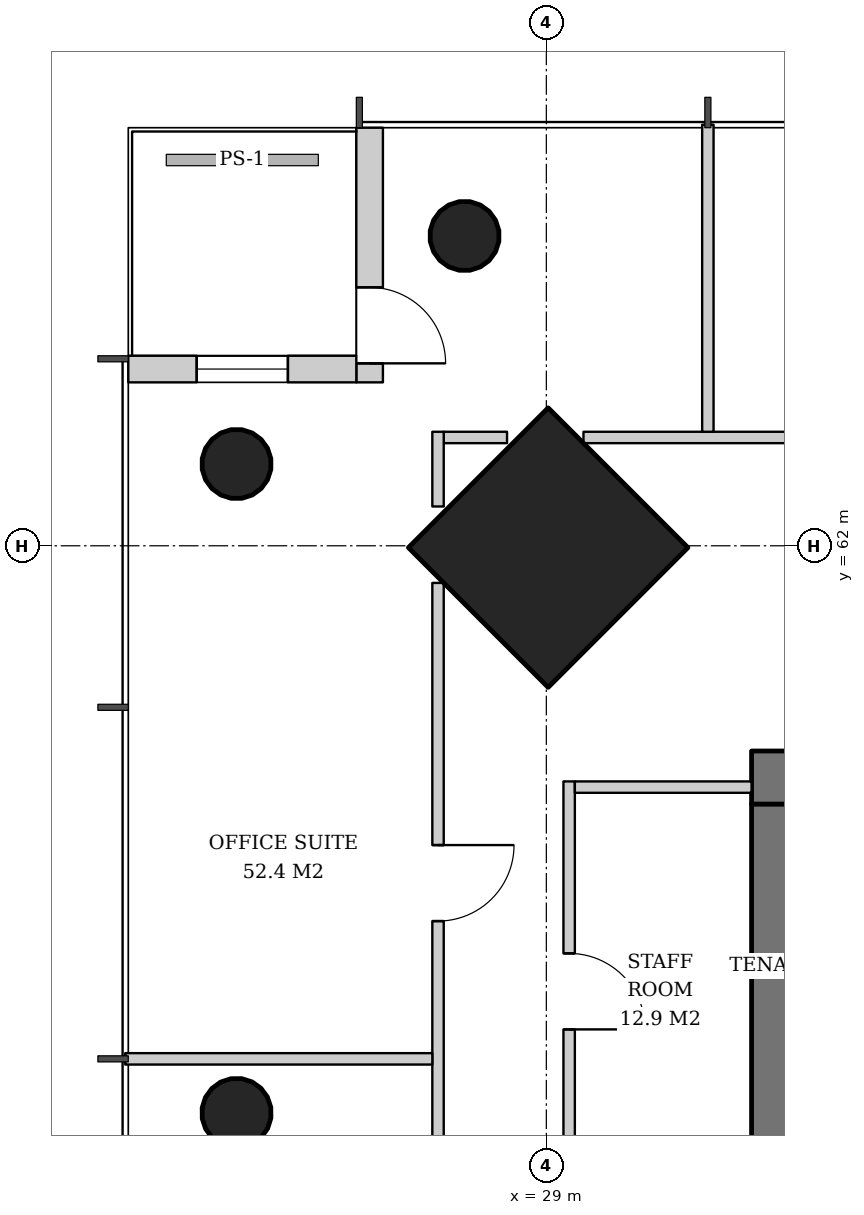
"""IFC4 building model, lengths in metres.
Left out: names, types, materials, properties, quantities, classifications, styles, units other than length and angle.
Written with IfcOpenShell. Run it as: python <this file> out.ifc"""

import sys

from ifc_helpers import new_model, si_unit, direction, frame, frame_2d, origin, origin_2d, place, context, subcontext, project, spatial, rectangle, hollow_circle, extrude, element, fill, save


model = new_model("IFC4")
c1 = context("Model", 3, precision=1e-05, world=origin(), true_north=direction((0.0, 1.0)))
c2 = subcontext(c1, "Body", "Model", "MODEL_VIEW")
j1 = project(units=[si_unit("LENGTHUNIT", "METRE"), si_unit("PLANEANGLEUNIT", "RADIAN")], contexts=[c1])
p1 = place(None, origin())
s1 = spatial("IfcSite", under=j1, at=p1, CompositionType="ELEMENT")
p2 = place(p1, origin())
s2 = spatial("IfcBuilding", under=s1, at=p2, CompositionType="ELEMENT")
p3 = place(p2, frame((0.0, 0.0, 142.6)))
s3 = spatial("IfcBuildingStorey", under=s2, at=p3, CompositionType="ELEMENT", Elevation=142.6)
p4 = place(p3, frame((28.986, 62.014, 0.0), z_axis=(0.031964207655, -0.031964207655, 0.998977766949), x_axis=(0.707106781187, 0.707106781187, 0.0)))
e1 = element("IfcColumn", 1, at=p4, inside=s3, PredefinedType="COLUMN", context=c2, shape_type="SweptSolid", body=[
    extrude(rectangle(XDim=2.6, YDim=2.6, at=origin_2d()), origin(), (0.0, 0.0, 1.0), 3.804),
])
for number, where, z_axis, x_axis in (
    (2, (27.886, 66.114, 0.0), (0.032, -0.032, 0.999), (0.707, 0.707, 0.0)),
    (3, (24.886, 63.114, 0.0), (0.032, -0.032, 0.999), (0.707, 0.707, 0.0)),
):
    element("IfcColumn", number, at=place(p3, frame(where, z_axis=z_axis, x_axis=x_axis)), inside=s3, PredefinedType="COLUMN", context=c2, shape_type="SweptSolid", body=[
        extrude(hollow_circle(Radius=0.457, WallThickness=0.03, at=origin_2d()), origin(), (0.0, 0.0, 1.0), 3.804),
    ])
p5 = place(p3, frame((24.886, 54.557, 0.0), z_axis=(0.031912317206, -0.01598826355, 0.999362786699), x_axis=(0.447933021895, 0.894067115991, 0.0)))
e4 = element("IfcColumn", 4, at=p5, inside=s3, PredefinedType="COLUMN", context=c2, shape_type="SweptSolid", body=[
    extrude(hollow_circle(Radius=0.457, WallThickness=0.03, at=origin_2d()), origin(), (0.0, 0.0, 1.0), 3.802),
])
p6 = place(p3, frame((31.7, 58.95, 0.0), z_axis=(0.0, 0.0, 1.0), x_axis=(1.0, 0.0, 0.0)))
e5 = element("IfcWall", 5, at=p6, inside=s3, PredefinedType="SHEAR", context=c2, shape_type="SweptSolid", body=[
    extrude(rectangle(XDim=26.6, YDim=0.7, at=frame_2d((13.3, 0.0))), origin(), (0.0, 0.0, 1.0), 3.8),
])
p7 = place(p6, frame((17.94, 0.0, 0.0)))
e6 = element("IfcOpeningElement", 6, at=p7, cuts=e5, PredefinedType="OPENING", context=c2, shape_type="SweptSolid", body=[
    extrude(rectangle(XDim=1.0, YDim=2.1, at=frame_2d((0.5, 1.05))), frame((0.0, 0.36, 0.0), z_axis=(0.0, -1.0, 0.0), x_axis=(1.0, 0.0, 0.0)), (0.0, 0.0, 1.0), 0.72),
])
p8 = place(p6, frame((5.825, 0.0, 0.0)))
e7 = element("IfcOpeningElement", 7, at=p8, cuts=e5, PredefinedType="OPENING", context=c2, shape_type="SweptSolid", body=[
    extrude(rectangle(XDim=1.0, YDim=2.1, at=frame_2d((0.5, 1.05))), frame((0.0, 0.36, 0.0), z_axis=(0.0, -1.0, 0.0), x_axis=(1.0, 0.0, 0.0)), (0.0, 0.0, 1.0), 0.72),
])
p9 = place(p6, frame((0.978, 0.0, 0.0)))
e8 = element("IfcOpeningElement", 8, at=p9, cuts=e5, PredefinedType="OPENING", context=c2, shape_type="SweptSolid", body=[
    extrude(rectangle(XDim=1.0, YDim=2.1, at=frame_2d((0.5, 1.05))), frame((0.0, 0.36, 0.0), z_axis=(0.0, -1.0, 0.0), x_axis=(1.0, 0.0, 0.0)), (0.0, 0.0, 1.0), 0.72),
])
p10 = place(p6, frame((2.587, 0.0, 0.0)))
e9 = element("IfcOpeningElement", 9, at=p10, cuts=e5, PredefinedType="OPENING", context=c2, shape_type="SweptSolid", body=[
    extrude(rectangle(XDim=1.0, YDim=2.1, at=frame_2d((0.5, 1.05))), frame((0.0, 0.36, 0.0), z_axis=(0.0, -1.0, 0.0), x_axis=(1.0, 0.0, 0.0)), (0.0, 0.0, 1.0), 0.72),
])
p11 = place(p6, frame((4.211, 0.0, 0.0)))
e10 = element("IfcOpeningElement", 10, at=p11, cuts=e5, PredefinedType="OPENING", context=c2, shape_type="SweptSolid", body=[
    extrude(rectangle(XDim=1.0, YDim=2.1, at=frame_2d((0.5, 1.05))), frame((0.0, 0.36, 0.0), z_axis=(0.0, -1.0, 0.0), x_axis=(1.0, 0.0, 0.0)), (0.0, 0.0, 1.0), 0.72),
])
p12 = place(p6, frame((8.44, 0.0, 0.0)))
e11 = element("IfcOpeningElement", 11, at=p12, cuts=e5, PredefinedType="OPENING", context=c2, shape_type="SweptSolid", body=[
    extrude(rectangle(XDim=1.0, YDim=2.1, at=frame_2d((0.5, 1.05))), frame((0.0, 0.36, 0.0), z_axis=(0.0, -1.0, 0.0), x_axis=(1.0, 0.0, 0.0)), (0.0, 0.0, 1.0), 0.72),
])
p13 = place(p6, frame((13.342, 0.0, 0.0)))
e12 = element("IfcOpeningElement", 12, at=p13, cuts=e5, PredefinedType="OPENING", context=c2, shape_type="SweptSolid", body=[
    extrude(rectangle(XDim=1.0, YDim=2.1, at=frame_2d((0.5, 1.05))), frame((0.0, 0.36, 0.0), z_axis=(0.0, -1.0, 0.0), x_axis=(1.0, 0.0, 0.0)), (0.0, 0.0, 1.0), 0.72),
])
p14 = place(p6, frame((22.4, 0.0, 0.0)))
e13 = element("IfcOpeningElement", 13, at=p14, cuts=e5, PredefinedType="OPENING", context=c2, shape_type="SweptSolid", body=[
    extrude(rectangle(XDim=1.0, YDim=2.1, at=frame_2d((0.5, 1.05))), frame((0.0, 0.36, 0.0), z_axis=(0.0, -1.0, 0.0), x_axis=(1.0, 0.0, 0.0)), (0.0, 0.0, 1.0), 0.72),
])
p15 = place(p3, frame((32.05, 33.4, 0.0), z_axis=(0.0, 0.0, 1.0), x_axis=(0.0, 1.0, 0.0)))
e14 = element("IfcWall", 14, at=p15, inside=s3, PredefinedType="SHEAR", context=c2, shape_type="SweptSolid", body=[
    extrude(rectangle(XDim=25.2, YDim=0.7, at=frame_2d((12.6, 0.0))), origin(), (0.0, 0.0, 1.0), 3.8),
])
p16 = place(p15, frame((11.7, 0.0, 0.0)))
e15 = element("IfcOpeningElement", 15, at=p16, cuts=e14, PredefinedType="OPENING", context=c2, shape_type="SweptSolid", body=[
    extrude(rectangle(XDim=1.8, YDim=2.4, at=frame_2d((0.9, 1.2))), frame((0.0, 0.36, 0.0), z_axis=(0.0, -1.0, 0.0), x_axis=(1.0, 0.0, 0.0)), (0.0, 0.0, 1.0), 0.72),
])
p17 = place(p15, frame((3.6, 0.0, 0.0)))
e16 = element("IfcOpeningElement", 16, at=p17, cuts=e14, PredefinedType="OPENING", context=c2, shape_type="SweptSolid", body=[
    extrude(rectangle(XDim=1.0, YDim=2.1, at=frame_2d((0.5, 1.05))), frame((0.0, 0.36, 0.0), z_axis=(0.0, -1.0, 0.0), x_axis=(1.0, 0.0, 0.0)), (0.0, 0.0, 1.0), 0.72),
])
p18 = place(p15, frame((6.35, 0.0, 0.0)))
e17 = element("IfcOpeningElement", 17, at=p18, cuts=e14, PredefinedType="OPENING", context=c2, shape_type="SweptSolid", body=[
    extrude(rectangle(XDim=1.0, YDim=2.1, at=frame_2d((0.5, 1.05))), frame((0.0, 0.36, 0.0), z_axis=(0.0, -1.0, 0.0), x_axis=(1.0, 0.0, 0.0)), (0.0, 0.0, 1.0), 0.72),
])
p19 = place(p15, frame((9.1, 0.0, 0.0)))
e18 = element("IfcOpeningElement", 18, at=p19, cuts=e14, PredefinedType="OPENING", context=c2, shape_type="SweptSolid", body=[
    extrude(rectangle(XDim=1.0, YDim=2.1, at=frame_2d((0.5, 1.05))), frame((0.0, 0.36, 0.0), z_axis=(0.0, -1.0, 0.0), x_axis=(1.0, 0.0, 0.0)), (0.0, 0.0, 1.0), 0.72),
])
p20 = place(p15, frame((15.1, 0.0, 0.0)))
e19 = element("IfcOpeningElement", 19, at=p20, cuts=e14, PredefinedType="OPENING", context=c2, shape_type="SweptSolid", body=[
    extrude(rectangle(XDim=1.0, YDim=2.1, at=frame_2d((0.5, 1.05))), frame((0.0, 0.36, 0.0), z_axis=(0.0, -1.0, 0.0), x_axis=(1.0, 0.0, 0.0)), (0.0, 0.0, 1.0), 0.72),
])
p21 = place(p15, frame((17.85, 0.0, 0.0)))
e20 = element("IfcOpeningElement", 20, at=p21, cuts=e14, PredefinedType="OPENING", context=c2, shape_type="SweptSolid", body=[
    extrude(rectangle(XDim=1.0, YDim=2.1, at=frame_2d((0.5, 1.05))), frame((0.0, 0.36, 0.0), z_axis=(0.0, -1.0, 0.0), x_axis=(1.0, 0.0, 0.0)), (0.0, 0.0, 1.0), 0.72),
])
p22 = place(p3, frame((26.675, 67.5, 0.0), z_axis=(0.0, 0.0, 1.0), x_axis=(0.0, -1.0, 0.0)))
e21 = element("IfcWall", 21, at=p22, inside=s3, PredefinedType="SOLIDWALL", context=c2, shape_type="SweptSolid", body=[
    extrude(rectangle(XDim=3.35, YDim=0.35, at=frame_2d((1.675, 0.0))), origin(), (0.0, 0.0, 1.0), 3.62),
])
p23 = place(p22, frame((2.1, 0.0, 0.0)))
e22 = element("IfcOpeningElement", 22, at=p23, cuts=e21, PredefinedType="OPENING", context=c2, shape_type="SweptSolid", body=[
    extrude(rectangle(XDim=1.0, YDim=2.4, at=frame_2d((0.5, 1.2))), frame((0.0, 0.185, 0.0), z_axis=(0.0, -1.0, 0.0), x_axis=(1.0, 0.0, 0.0)), (0.0, 0.0, 1.0), 0.37),
])
p24 = place(p3, frame((26.5, 64.325, 0.0), z_axis=(0.0, 0.0, 1.0), x_axis=(-1.0, 0.0, 0.0)))
e23 = element("IfcWall", 23, at=p24, inside=s3, PredefinedType="SOLIDWALL", context=c2, shape_type="SweptSolid", body=[
    extrude(rectangle(XDim=3.0, YDim=0.35, at=frame_2d((1.5, 0.0))), origin(), (0.0, 0.0, 1.0), 3.62),
])
p25 = place(p24, frame((0.9, 0.0, 0.6)))
e24 = element("IfcOpeningElement", 24, at=p25, cuts=e23, PredefinedType="OPENING", context=c2, shape_type="SweptSolid", body=[
    extrude(rectangle(XDim=1.2, YDim=2.55, at=frame_2d((0.6, 1.275))), frame((0.0, 0.185, 0.0), z_axis=(0.0, -1.0, 0.0), x_axis=(1.0, 0.0, 0.0)), (0.0, 0.0, 1.0), 0.37),
])
p26 = place(p3, frame((29.3, 58.9, 0.0), z_axis=(0.0, 0.0, 1.0), x_axis=(0.0, -1.0, 0.0)))
e25 = element("IfcWall", 25, at=p26, inside=s3, PredefinedType="PARTITIONING", context=c2, shape_type="SweptSolid", body=[
    extrude(rectangle(XDim=5.525, YDim=0.15, at=frame_2d((2.762, 0.0))), origin(), (0.0, 0.0, 1.0), 2.72),
])
p27 = place(p26, frame((2.262, 0.0, 0.0)))
e26 = element("IfcOpeningElement", 26, at=p27, cuts=e25, PredefinedType="OPENING", context=c2, shape_type="SweptSolid", body=[
    extrude(rectangle(XDim=1.0, YDim=2.1, at=frame_2d((0.5, 1.05))), frame((0.0, 0.085, 0.0), z_axis=(0.0, -1.0, 0.0), x_axis=(1.0, 0.0, 0.0)), (0.0, 0.0, 1.0), 0.17),
])
p28 = place(p3, frame((31.7, 58.825, 0.0), z_axis=(0.0, 0.0, 1.0), x_axis=(-1.0, 0.0, 0.0)))
e27 = element("IfcWall", 27, at=p28, inside=s3, PredefinedType="PARTITIONING", context=c2, shape_type="SweptSolid", body=[
    extrude(rectangle(XDim=2.325, YDim=0.15, at=frame_2d((1.163, 0.0))), origin(), (0.0, 0.0, 1.0), 2.72),
])
p29 = place(p3, frame((60.511, 63.425, 0.0), z_axis=(0.0, 0.0, 1.0), x_axis=(-1.0, 0.0, 0.0)))
e28 = element("IfcWall", 28, at=p29, inside=s3, PredefinedType="PARTITIONING", context=c2, shape_type="SweptSolid", body=[
    extrude(rectangle(XDim=31.023, YDim=0.15, at=frame_2d((15.511, 0.0))), origin(), (0.0, 0.0, 1.0), 2.72),
])
p30 = place(p29, frame((3.049, 0.0, 0.0)))
e29 = element("IfcOpeningElement", 29, at=p30, cuts=e28, PredefinedType="OPENING", context=c2, shape_type="SweptSolid", body=[
    extrude(rectangle(XDim=1.8, YDim=2.4, at=frame_2d((0.9, 1.2))), frame((0.0, 0.085, 0.0), z_axis=(0.0, -1.0, 0.0), x_axis=(1.0, 0.0, 0.0)), (0.0, 0.0, 1.0), 0.17),
])
p31 = place(p29, frame((7.674, 0.0, 0.0)))
e30 = element("IfcOpeningElement", 30, at=p31, cuts=e28, PredefinedType="OPENING", context=c2, shape_type="SweptSolid", body=[
    extrude(rectangle(XDim=1.8, YDim=2.4, at=frame_2d((0.9, 1.2))), frame((0.0, 0.085, 0.0), z_axis=(0.0, -1.0, 0.0), x_axis=(1.0, 0.0, 0.0)), (0.0, 0.0, 1.0), 0.17),
])
p32 = place(p3, frame((28.483, 63.425, 0.0), z_axis=(0.0, 0.0, 1.0), x_axis=(-1.0, 0.0, 0.0)))
e31 = element("IfcWall", 31, at=p32, inside=s3, PredefinedType="PARTITIONING", context=c2, shape_type="SweptSolid", body=[
    extrude(rectangle(XDim=0.833, YDim=0.15, at=frame_2d((0.417, 0.0))), origin(), (0.0, 0.0, 1.0), 3.32),
])
p33 = place(p3, frame((31.125, 63.5, 0.0), z_axis=(0.0, 0.0, 1.0), x_axis=(0.0, 1.0, 0.0)))
e32 = element("IfcWall", 32, at=p33, inside=s3, PredefinedType="PARTITIONING", context=c2, shape_type="SweptSolid", body=[
    extrude(rectangle(XDim=4.04, YDim=0.15, at=frame_2d((2.02, 0.0))), origin(), (0.0, 0.0, 1.0), 2.82),
])
p34 = place(p3, frame((27.575, 63.5, 0.0), z_axis=(0.0, 0.0, 1.0), x_axis=(0.0, -1.0, 0.0)))
e33 = element("IfcWall", 33, at=p34, inside=s3, PredefinedType="PARTITIONING", context=c2, shape_type="SweptSolid", body=[
    extrude(rectangle(XDim=0.983, YDim=0.15, at=frame_2d((0.491, 0.0))), origin(), (0.0, 0.0, 1.0), 3.32),
])
p35 = place(p3, frame((27.575, 61.511, 0.0), z_axis=(0.0, 0.0, 1.0), x_axis=(0.0, -1.0, 0.0)))
e34 = element("IfcWall", 34, at=p35, inside=s3, PredefinedType="PARTITIONING", context=c2, shape_type="SweptSolid", body=[
    extrude(rectangle(XDim=31.023, YDim=0.15, at=frame_2d((15.511, 0.0))), origin(), (0.0, 0.0, 1.0), 2.72),
])
p36 = place(p35, frame((3.449, 0.0, 0.0)))
e35 = element("IfcOpeningElement", 35, at=p36, cuts=e34, PredefinedType="OPENING", context=c2, shape_type="SweptSolid", body=[
    extrude(rectangle(XDim=1.0, YDim=2.1, at=frame_2d((0.5, 1.05))), frame((0.0, 0.085, 0.0), z_axis=(0.0, -1.0, 0.0), x_axis=(1.0, 0.0, 0.0)), (0.0, 0.0, 1.0), 0.17),
])
p37 = place(p35, frame((8.074, 0.0, 0.0)))
e36 = element("IfcOpeningElement", 36, at=p37, cuts=e34, PredefinedType="OPENING", context=c2, shape_type="SweptSolid", body=[
    extrude(rectangle(XDim=1.0, YDim=2.1, at=frame_2d((0.5, 1.05))), frame((0.0, 0.085, 0.0), z_axis=(0.0, -1.0, 0.0), x_axis=(1.0, 0.0, 0.0)), (0.0, 0.0, 1.0), 0.17),
])
p38 = place(p35, frame((12.699, 0.0, 0.0)))
e37 = element("IfcOpeningElement", 37, at=p38, cuts=e34, PredefinedType="OPENING", context=c2, shape_type="SweptSolid", body=[
    extrude(rectangle(XDim=1.0, YDim=2.1, at=frame_2d((0.5, 1.05))), frame((0.0, 0.085, 0.0), z_axis=(0.0, -1.0, 0.0), x_axis=(1.0, 0.0, 0.0)), (0.0, 0.0, 1.0), 0.17),
])
p39 = place(p35, frame((17.424, 0.0, 0.0)))
e38 = element("IfcOpeningElement", 38, at=p39, cuts=e34, PredefinedType="OPENING", context=c2, shape_type="SweptSolid", body=[
    extrude(rectangle(XDim=0.8, YDim=2.1, at=frame_2d((0.4, 1.05))), frame((0.0, 0.085, 0.0), z_axis=(0.0, -1.0, 0.0), x_axis=(1.0, 0.0, 0.0)), (0.0, 0.0, 1.0), 0.17),
])
p40 = place(p35, frame((21.949, 0.0, 0.0)))
e39 = element("IfcOpeningElement", 39, at=p40, cuts=e34, PredefinedType="OPENING", context=c2, shape_type="SweptSolid", body=[
    extrude(rectangle(XDim=1.0, YDim=2.1, at=frame_2d((0.5, 1.05))), frame((0.0, 0.085, 0.0), z_axis=(0.0, -1.0, 0.0), x_axis=(1.0, 0.0, 0.0)), (0.0, 0.0, 1.0), 0.17),
])
p41 = place(p35, frame((26.674, 0.0, 0.0)))
e40 = element("IfcOpeningElement", 40, at=p41, cuts=e34, PredefinedType="OPENING", context=c2, shape_type="SweptSolid", body=[
    extrude(rectangle(XDim=0.8, YDim=2.1, at=frame_2d((0.4, 1.05))), frame((0.0, 0.085, 0.0), z_axis=(0.0, -1.0, 0.0), x_axis=(1.0, 0.0, 0.0)), (0.0, 0.0, 1.0), 0.17),
])
p42 = place(p3, frame((27.5, 55.25, 0.0), z_axis=(0.0, 0.0, 1.0), x_axis=(-1.0, 0.0, 0.0)))
e41 = element("IfcWall", 41, at=p42, inside=s3, PredefinedType="PARTITIONING", context=c2, shape_type="SweptSolid", body=[
    extrude(rectangle(XDim=4.04, YDim=0.15, at=frame_2d((2.02, 0.0))), origin(), (0.0, 0.0, 1.0), 2.82),
])
p43 = place(p23, origin())
e42 = element("IfcDoor", 42, at=p43, inside=s3, OperationType="SINGLE_SWING_RIGHT", PredefinedType="DOOR", context=c2, shape_type="SweptSolid", body=[
    extrude(rectangle(XDim=1.0, YDim=2.4, at=frame_2d((0.5, 1.2))), frame((0.0, 0.025, 0.0), z_axis=(0.0, -1.0, 0.0), x_axis=(1.0, 0.0, 0.0)), (0.0, 0.0, 1.0), 0.05),
])
fill(e22, e42)
p44 = place(p25, origin())
e43 = element("IfcWindow", 43, at=p44, inside=s3, PartitioningType="SINGLE_PANEL", PredefinedType="WINDOW", context=c2, shape_type="SweptSolid", body=[
    extrude(rectangle(XDim=1.2, YDim=2.55, at=frame_2d((0.6, 1.275))), frame((0.0, 0.03, 0.0), z_axis=(0.0, -1.0, 0.0), x_axis=(1.0, 0.0, 0.0)), (0.0, 0.0, 1.0), 0.06),
])
fill(e24, e43)
p45 = place(p27, origin())
e44 = element("IfcDoor", 44, at=p45, inside=s3, OperationType="SINGLE_SWING_RIGHT", PredefinedType="DOOR", context=c2, shape_type="SweptSolid", body=[
    extrude(rectangle(XDim=1.0, YDim=2.1, at=frame_2d((0.5, 1.05))), frame((0.0, 0.025, 0.0), z_axis=(0.0, -1.0, 0.0), x_axis=(1.0, 0.0, 0.0)), (0.0, 0.0, 1.0), 0.05),
])
fill(e26, e44)
p46 = place(p36, origin())
e45 = element("IfcDoor", 45, at=p46, inside=s3, OperationType="SINGLE_SWING_LEFT", PredefinedType="DOOR", context=c2, shape_type="SweptSolid", body=[
    extrude(rectangle(XDim=1.0, YDim=2.1, at=frame_2d((0.5, 1.05))), frame((0.0, 0.025, 0.0), z_axis=(0.0, -1.0, 0.0), x_axis=(1.0, 0.0, 0.0)), (0.0, 0.0, 1.0), 0.05),
])
fill(e35, e45)
save(model, sys.argv[1])
